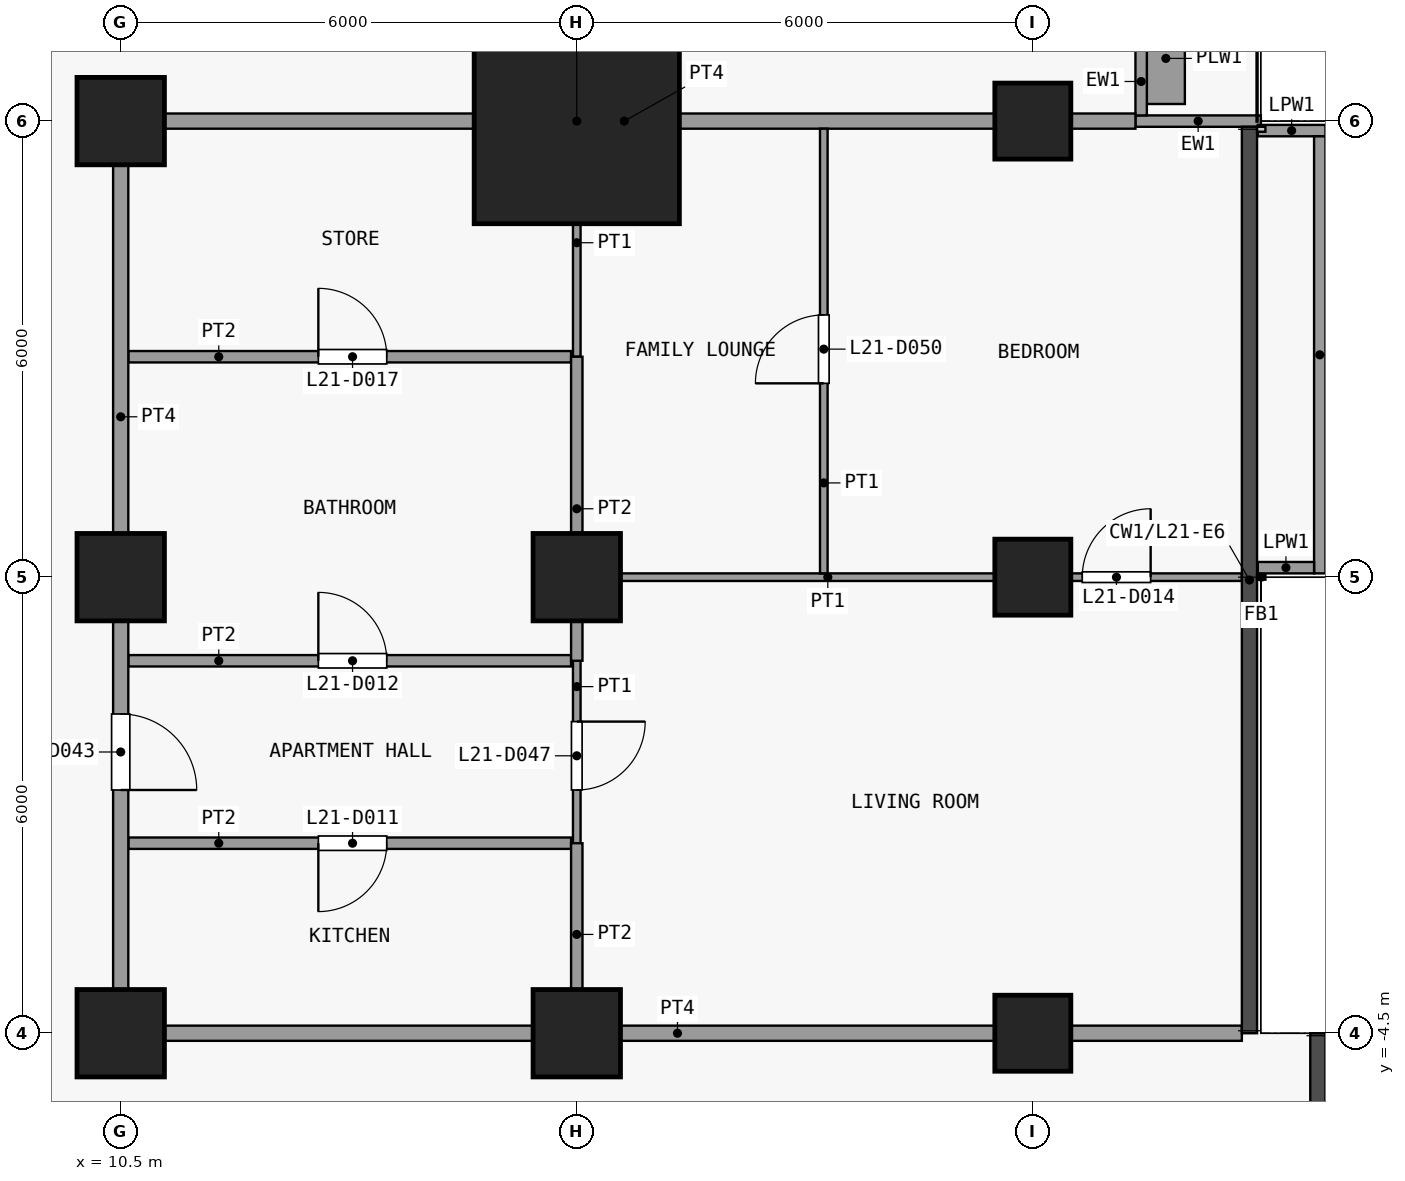
"""IFC4 building model, lengths in metres.
Left out: names, types, materials, properties, quantities, classifications, styles, units other than length and angle.
Written with IfcOpenShell. Run it as: python <this file> out.ifc"""

import sys

from ifc_helpers import new_model, si_unit, direction, frame, frame_2d, origin, origin_2d, place, context, subcontext, project, spatial, rectangle, extrude, element, fill, save


model = new_model("IFC4")
c1 = context("Model", 3, precision=1e-05, world=origin(), true_north=direction((0.0, 1.0)))
c2 = subcontext(c1, "Body", "Model", "MODEL_VIEW")
j1 = project(units=[si_unit("LENGTHUNIT", "METRE"), si_unit("PLANEANGLEUNIT", "RADIAN")], contexts=[c1])
p1 = place(None, origin())
s1 = spatial("IfcSite", under=j1, at=p1, CompositionType="ELEMENT")
p2 = place(p1, origin())
s2 = spatial("IfcBuilding", under=s1, at=p2, CompositionType="ELEMENT")
p3 = place(p2, frame((0.0, 0.0, 88.3)))
s3 = spatial("IfcBuildingStorey", under=s2, at=p3, CompositionType="ELEMENT", Elevation=88.3)
for number, where, z_axis, x_axis in (
    (1, (10.5, -4.5, 0.0), (0.0, 0.0, 1.0), (1.0, 0.0, 0.0)),
    (2, (10.5, 1.5, 0.0), (0.0, 0.0, 1.0), (1.0, 0.0, 0.0)),
    (3, (10.5, 7.5, 0.0), (0.0, 0.0, 1.0), (1.0, 0.0, 0.0)),
    (4, (16.5, -4.5, 0.0), (0.0, 0.0, 1.0), (1.0, 0.0, 0.0)),
    (5, (16.5, 1.5, 0.0), (0.0, 0.0, 1.0), (1.0, 0.0, 0.0)),
):
    element("IfcColumn", number, at=place(p3, frame(where, z_axis=z_axis, x_axis=x_axis)), inside=s3, PredefinedType="COLUMN", context=c2, shape_type="SweptSolid", body=[
        extrude(rectangle(XDim=1.15, YDim=1.15, at=origin_2d()), origin(), (0.0, 0.0, 1.0), 3.6),
    ])
p4 = place(p3, frame((16.5, 7.5, 0.0), z_axis=(0.0, 0.0, 1.0), x_axis=(1.0, 0.0, 0.0)))
e6 = element("IfcColumn", 6, at=p4, inside=s3, PredefinedType="COLUMN", context=c2, shape_type="SweptSolid", body=[
    extrude(rectangle(XDim=2.7, YDim=2.7, at=origin_2d()), origin(), (0.0, 0.0, 1.0), 3.6),
])
for number, where, z_axis, x_axis in (
    (7, (22.5, -4.5, 0.0), (0.0, 0.0, 1.0), (1.0, 0.0, 0.0)),
    (8, (22.5, 1.5, 0.0), (0.0, 0.0, 1.0), (1.0, 0.0, 0.0)),
    (9, (22.5, 7.5, 0.0), (0.0, 0.0, 1.0), (1.0, 0.0, 0.0)),
):
    element("IfcColumn", number, at=place(p3, frame(where, z_axis=z_axis, x_axis=x_axis)), inside=s3, PredefinedType="COLUMN", context=c2, shape_type="SweptSolid", body=[
        extrude(rectangle(XDim=1.0, YDim=1.0, at=origin_2d()), origin(), (0.0, 0.0, 1.0), 3.6),
    ])
p5 = place(p3, frame((23.85, 7.5, 0.0), z_axis=(0.0, 0.0, 1.0), x_axis=(1.0, 0.0, 0.0)))
e10 = element("IfcWall", 10, at=p5, inside=s3, PredefinedType="SOLIDWALL", context=c2, shape_type="SweptSolid", body=[
    extrude(rectangle(XDim=1.65, YDim=0.15, at=frame_2d((0.825, 0.0))), origin(), (0.0, 0.0, 1.0), 3.3),
])
p6 = place(p3, frame((23.925, 13.425, 0.0), z_axis=(0.0, 0.0, 1.0), x_axis=(0.0, -1.0, 0.0)))
e11 = element("IfcWall", 11, at=p6, inside=s3, PredefinedType="SOLIDWALL", context=c2, shape_type="SweptSolid", body=[
    extrude(rectangle(XDim=5.85, YDim=0.15, at=frame_2d((2.925, 0.0))), origin(), (0.0, 0.0, 1.0), 3.3),
])
p7 = place(p6, frame((0.825, 0.0, 0.0)))
e12 = element("IfcOpeningElement", 12, at=p7, cuts=e11, PredefinedType="OPENING", context=c2, shape_type="SweptSolid", body=[
    extrude(rectangle(XDim=1.2, YDim=2.4, at=frame_2d((0.6, 1.2))), frame((0.0, 0.085, 0.0), z_axis=(0.0, -1.0, 0.0), x_axis=(1.0, 0.0, 0.0)), (0.0, 0.0, 1.0), 0.17),
])
p8 = place(p6, frame((3.038, 0.0, 0.9)))
e13 = element("IfcOpeningElement", 13, at=p8, cuts=e11, PredefinedType="OPENING", context=c2, shape_type="SweptSolid", body=[
    extrude(rectangle(XDim=1.8, YDim=2.1, at=frame_2d((0.9, 1.05))), frame((0.0, 0.085, 0.0), z_axis=(0.0, -1.0, 0.0), x_axis=(1.0, 0.0, 0.0)), (0.0, 0.0, 1.0), 0.17),
])
p9 = place(p3, frame((24.25, 7.725, 0.0), z_axis=(0.0, 0.0, 1.0), x_axis=(0.0, 1.0, 0.0)))
e14 = element("IfcWall", 14, at=p9, inside=s3, PredefinedType="USERDEFINED", context=c2, shape_type="SweptSolid", body=[
    extrude(rectangle(XDim=1.2, YDim=0.5, at=frame_2d((0.6, 0.0))), origin(), (0.0, 0.0, 1.0), 0.9),
])
p10 = place(p3, frame((25.46, 7.375, 0.0), z_axis=(0.0, 0.0, 1.0), x_axis=(1.0, 0.0, 0.0)))
e15 = element("IfcWall", 15, at=p10, inside=s3, PredefinedType="PARAPET", context=c2, shape_type="SweptSolid", body=[
    extrude(rectangle(XDim=0.89, YDim=0.15, at=frame_2d((0.445, 0.0))), origin(), (0.0, 0.0, 1.0), 1.15),
])
p11 = place(p3, frame((26.275, 7.3, 0.0), z_axis=(0.0, 0.0, 1.0), x_axis=(0.0, -1.0, 0.0)))
e16 = element("IfcWall", 16, at=p11, inside=s3, PredefinedType="PARAPET", context=c2, shape_type="SweptSolid", body=[
    extrude(rectangle(XDim=5.75, YDim=0.15, at=frame_2d((2.875, 0.0))), origin(), (0.0, 0.0, 1.0), 1.15),
])
p12 = place(p3, frame((26.2, 1.625, 0.0), z_axis=(0.0, 0.0, 1.0), x_axis=(-1.0, 0.0, 0.0)))
e17 = element("IfcWall", 17, at=p12, inside=s3, PredefinedType="PARAPET", context=c2, shape_type="SweptSolid", body=[
    extrude(rectangle(XDim=0.74, YDim=0.15, at=frame_2d((0.37, 0.0))), origin(), (0.0, 0.0, 1.0), 1.15),
])
p13 = place(p3, frame((10.4, -4.5, 0.0), z_axis=(0.0, 0.0, 1.0), x_axis=(1.0, 0.0, 0.0)))
e18 = element("IfcWall", 18, at=p13, inside=s3, PredefinedType="PARTITIONING", context=c2, shape_type="SweptSolid", body=[
    extrude(rectangle(XDim=14.85, YDim=0.2, at=frame_2d((7.425, 0.0))), origin(), (0.0, 0.0, 1.0), 3.3),
])
p14 = place(p3, frame((10.6, -2.0, 0.0), z_axis=(0.0, 0.0, 1.0), x_axis=(1.0, 0.0, 0.0)))
e19 = element("IfcWall", 19, at=p14, inside=s3, PredefinedType="PARTITIONING", context=c2, shape_type="SweptSolid", body=[
    extrude(rectangle(XDim=5.825, YDim=0.15, at=frame_2d((2.913, 0.0))), origin(), (0.0, 0.0, 1.0), 3.3),
])
p15 = place(p14, frame((2.5, 0.0, 0.0)))
e20 = element("IfcOpeningElement", 20, at=p15, cuts=e19, PredefinedType="OPENING", context=c2, shape_type="SweptSolid", body=[
    extrude(rectangle(XDim=0.9, YDim=2.1, at=frame_2d((0.45, 1.05))), frame((0.0, 0.085, 0.0), z_axis=(0.0, -1.0, 0.0), x_axis=(1.0, 0.0, 0.0)), (0.0, 0.0, 1.0), 0.17),
])
p16 = place(p3, frame((10.6, 0.4, 0.0), z_axis=(0.0, 0.0, 1.0), x_axis=(1.0, 0.0, 0.0)))
e21 = element("IfcWall", 21, at=p16, inside=s3, PredefinedType="PARTITIONING", context=c2, shape_type="SweptSolid", body=[
    extrude(rectangle(XDim=5.825, YDim=0.15, at=frame_2d((2.913, 0.0))), origin(), (0.0, 0.0, 1.0), 3.3),
])
p17 = place(p16, frame((2.5, 0.0, 0.0)))
e22 = element("IfcOpeningElement", 22, at=p17, cuts=e21, PredefinedType="OPENING", context=c2, shape_type="SweptSolid", body=[
    extrude(rectangle(XDim=0.9, YDim=2.1, at=frame_2d((0.45, 1.05))), frame((0.0, 0.085, 0.0), z_axis=(0.0, -1.0, 0.0), x_axis=(1.0, 0.0, 0.0)), (0.0, 0.0, 1.0), 0.17),
])
p18 = place(p3, frame((16.575, 1.5, 0.0), z_axis=(0.0, 0.0, 1.0), x_axis=(1.0, 0.0, 0.0)))
e23 = element("IfcWall", 23, at=p18, inside=s3, PredefinedType="PARTITIONING", context=c2, shape_type="SweptSolid", body=[
    extrude(rectangle(XDim=8.675, YDim=0.1, at=frame_2d((4.337, 0.0))), origin(), (0.0, 0.0, 1.0), 3.3),
])
p19 = place(p18, frame((6.575, 0.0, 0.0)))
e24 = element("IfcOpeningElement", 24, at=p19, cuts=e23, PredefinedType="OPENING", context=c2, shape_type="SweptSolid", body=[
    extrude(rectangle(XDim=0.9, YDim=2.1, at=frame_2d((0.45, 1.05))), frame((0.0, 0.06, 0.0), z_axis=(0.0, -1.0, 0.0), x_axis=(1.0, 0.0, 0.0)), (0.0, 0.0, 1.0), 0.12),
])
p20 = place(p3, frame((10.6, 4.4, 0.0), z_axis=(0.0, 0.0, 1.0), x_axis=(1.0, 0.0, 0.0)))
e25 = element("IfcWall", 25, at=p20, inside=s3, PredefinedType="PARTITIONING", context=c2, shape_type="SweptSolid", body=[
    extrude(rectangle(XDim=5.825, YDim=0.15, at=frame_2d((2.913, 0.0))), origin(), (0.0, 0.0, 1.0), 3.3),
])
p21 = place(p20, frame((2.5, 0.0, 0.0)))
e26 = element("IfcOpeningElement", 26, at=p21, cuts=e25, PredefinedType="OPENING", context=c2, shape_type="SweptSolid", body=[
    extrude(rectangle(XDim=0.9, YDim=2.1, at=frame_2d((0.45, 1.05))), frame((0.0, 0.085, 0.0), z_axis=(0.0, -1.0, 0.0), x_axis=(1.0, 0.0, 0.0)), (0.0, 0.0, 1.0), 0.17),
])
p22 = place(p3, frame((10.4, 7.5, 0.0), z_axis=(0.0, 0.0, 1.0), x_axis=(1.0, 0.0, 0.0)))
e27 = element("IfcWall", 27, at=p22, inside=s3, PredefinedType="PARTITIONING", context=c2, shape_type="SweptSolid", body=[
    extrude(rectangle(XDim=13.45, YDim=0.2, at=frame_2d((6.725, 0.0))), origin(), (0.0, 0.0, 1.0), 3.3),
])
p23 = place(p3, frame((10.5, -4.4, 0.0), z_axis=(0.0, 0.0, 1.0), x_axis=(0.0, 1.0, 0.0)))
e28 = element("IfcWall", 28, at=p23, inside=s3, PredefinedType="PARTITIONING", context=c2, shape_type="SweptSolid", body=[
    extrude(rectangle(XDim=11.8, YDim=0.2, at=frame_2d((5.9, 0.0))), origin(), (0.0, 0.0, 1.0), 3.3),
])
p24 = place(p23, frame((3.1, 0.0, 0.0)))
e29 = element("IfcOpeningElement", 29, at=p24, cuts=e28, PredefinedType="OPENING", context=c2, shape_type="SweptSolid", body=[
    extrude(rectangle(XDim=1.0, YDim=2.1, at=frame_2d((0.5, 1.05))), frame((0.0, 0.11, 0.0), z_axis=(0.0, -1.0, 0.0), x_axis=(1.0, 0.0, 0.0)), (0.0, 0.0, 1.0), 0.22),
])
p25 = place(p3, frame((16.5, -2.0, 0.0), z_axis=(0.0, 0.0, 1.0), x_axis=(0.0, 1.0, 0.0)))
e30 = element("IfcWall", 30, at=p25, inside=s3, PredefinedType="PARTITIONING", context=c2, shape_type="SweptSolid", body=[
    extrude(rectangle(XDim=2.4, YDim=0.1, at=frame_2d((1.2, 0.0))), origin(), (0.0, 0.0, 1.0), 3.3),
])
p26 = place(p25, frame((0.7, 0.0, 0.0)))
e31 = element("IfcOpeningElement", 31, at=p26, cuts=e30, PredefinedType="OPENING", context=c2, shape_type="SweptSolid", body=[
    extrude(rectangle(XDim=0.9, YDim=2.1, at=frame_2d((0.45, 1.05))), frame((0.0, 0.06, 0.0), z_axis=(0.0, -1.0, 0.0), x_axis=(1.0, 0.0, 0.0)), (0.0, 0.0, 1.0), 0.12),
])
p27 = place(p3, frame((16.5, 4.4, 0.0), z_axis=(0.0, 0.0, 1.0), x_axis=(0.0, 1.0, 0.0)))
e32 = element("IfcWall", 32, at=p27, inside=s3, PredefinedType="PARTITIONING", context=c2, shape_type="SweptSolid", body=[
    extrude(rectangle(XDim=3.0, YDim=0.1, at=frame_2d((1.5, 0.0))), origin(), (0.0, 0.0, 1.0), 3.3),
])
p28 = place(p3, frame((16.5, -4.4, 0.0), z_axis=(0.0, 0.0, 1.0), x_axis=(0.0, 1.0, 0.0)))
e33 = element("IfcWall", 33, at=p28, inside=s3, PredefinedType="PARTITIONING", context=c2, shape_type="SweptSolid", body=[
    extrude(rectangle(XDim=2.4, YDim=0.15, at=frame_2d((1.2, 0.0))), origin(), (0.0, 0.0, 1.0), 3.3),
])
p29 = place(p3, frame((16.5, 0.4, 0.0), z_axis=(0.0, 0.0, 1.0), x_axis=(0.0, 1.0, 0.0)))
e34 = element("IfcWall", 34, at=p29, inside=s3, PredefinedType="PARTITIONING", context=c2, shape_type="SweptSolid", body=[
    extrude(rectangle(XDim=4.0, YDim=0.15, at=frame_2d((2.0, 0.0))), origin(), (0.0, 0.0, 1.0), 3.3),
])
p30 = place(p3, frame((19.75, 1.55, 0.0), z_axis=(0.0, 0.0, 1.0), x_axis=(0.0, 1.0, 0.0)))
e35 = element("IfcWall", 35, at=p30, inside=s3, PredefinedType="PARTITIONING", context=c2, shape_type="SweptSolid", body=[
    extrude(rectangle(XDim=5.85, YDim=0.1, at=frame_2d((2.925, 0.0))), origin(), (0.0, 0.0, 1.0), 3.3),
])
p31 = place(p30, frame((2.5, 0.0, 0.0)))
e36 = element("IfcOpeningElement", 36, at=p31, cuts=e35, PredefinedType="OPENING", context=c2, shape_type="SweptSolid", body=[
    extrude(rectangle(XDim=0.9, YDim=2.1, at=frame_2d((0.45, 1.05))), frame((0.0, 0.06, 0.0), z_axis=(0.0, -1.0, 0.0), x_axis=(1.0, 0.0, 0.0)), (0.0, 0.0, 1.0), 0.12),
])
p32 = place(p15, origin())
e37 = element("IfcDoor", 37, at=p32, inside=s3, OperationType="SINGLE_SWING_LEFT", PredefinedType="DOOR", context=c2, shape_type="SweptSolid", body=[
    extrude(rectangle(XDim=0.9, YDim=2.1, at=frame_2d((0.45, 1.05))), frame((0.0, 0.025, 0.0), z_axis=(0.0, -1.0, 0.0), x_axis=(1.0, 0.0, 0.0)), (0.0, 0.0, 1.0), 0.05),
])
fill(e20, e37)
p33 = place(p17, origin())
e38 = element("IfcDoor", 38, at=p33, inside=s3, OperationType="SINGLE_SWING_RIGHT", PredefinedType="DOOR", context=c2, shape_type="SweptSolid", body=[
    extrude(rectangle(XDim=0.9, YDim=2.1, at=frame_2d((0.45, 1.05))), frame((0.0, 0.025, 0.0), z_axis=(0.0, -1.0, 0.0), x_axis=(1.0, 0.0, 0.0)), (0.0, 0.0, 1.0), 0.05),
])
fill(e22, e38)
p34 = place(p19, origin())
e39 = element("IfcDoor", 39, at=p34, inside=s3, OperationType="SINGLE_SWING_LEFT", PredefinedType="DOOR", context=c2, shape_type="SweptSolid", body=[
    extrude(rectangle(XDim=0.9, YDim=2.1, at=frame_2d((0.45, 1.05))), frame((0.0, 0.025, 0.0), z_axis=(0.0, -1.0, 0.0), x_axis=(1.0, 0.0, 0.0)), (0.0, 0.0, 1.0), 0.05),
])
fill(e24, e39)
p35 = place(p21, origin())
e40 = element("IfcDoor", 40, at=p35, inside=s3, OperationType="SINGLE_SWING_RIGHT", PredefinedType="DOOR", context=c2, shape_type="SweptSolid", body=[
    extrude(rectangle(XDim=0.9, YDim=2.1, at=frame_2d((0.45, 1.05))), frame((0.0, 0.025, 0.0), z_axis=(0.0, -1.0, 0.0), x_axis=(1.0, 0.0, 0.0)), (0.0, 0.0, 1.0), 0.05),
])
fill(e26, e40)
p36 = place(p24, origin())
e41 = element("IfcDoor", 41, at=p36, inside=s3, OperationType="SINGLE_SWING_LEFT", PredefinedType="DOOR", context=c2, shape_type="SweptSolid", body=[
    extrude(rectangle(XDim=1.0, YDim=2.1, at=frame_2d((0.5, 1.05))), frame((0.0, 0.025, 0.0), z_axis=(0.0, -1.0, 0.0), x_axis=(1.0, 0.0, 0.0)), (0.0, 0.0, 1.0), 0.05),
])
fill(e29, e41)
p37 = place(p26, origin())
e42 = element("IfcDoor", 42, at=p37, inside=s3, OperationType="SINGLE_SWING_RIGHT", PredefinedType="DOOR", context=c2, shape_type="SweptSolid", body=[
    extrude(rectangle(XDim=0.9, YDim=2.1, at=frame_2d((0.45, 1.05))), frame((0.0, 0.025, 0.0), z_axis=(0.0, -1.0, 0.0), x_axis=(1.0, 0.0, 0.0)), (0.0, 0.0, 1.0), 0.05),
])
fill(e31, e42)
p38 = place(p31, origin())
e43 = element("IfcDoor", 43, at=p38, inside=s3, OperationType="SINGLE_SWING_RIGHT", PredefinedType="DOOR", context=c2, shape_type="SweptSolid", body=[
    extrude(rectangle(XDim=0.9, YDim=2.1, at=frame_2d((0.45, 1.05))), frame((0.0, 0.025, 0.0), z_axis=(0.0, -1.0, 0.0), x_axis=(1.0, 0.0, 0.0)), (0.0, 0.0, 1.0), 0.05),
])
fill(e36, e43)
save(model, sys.argv[1])
